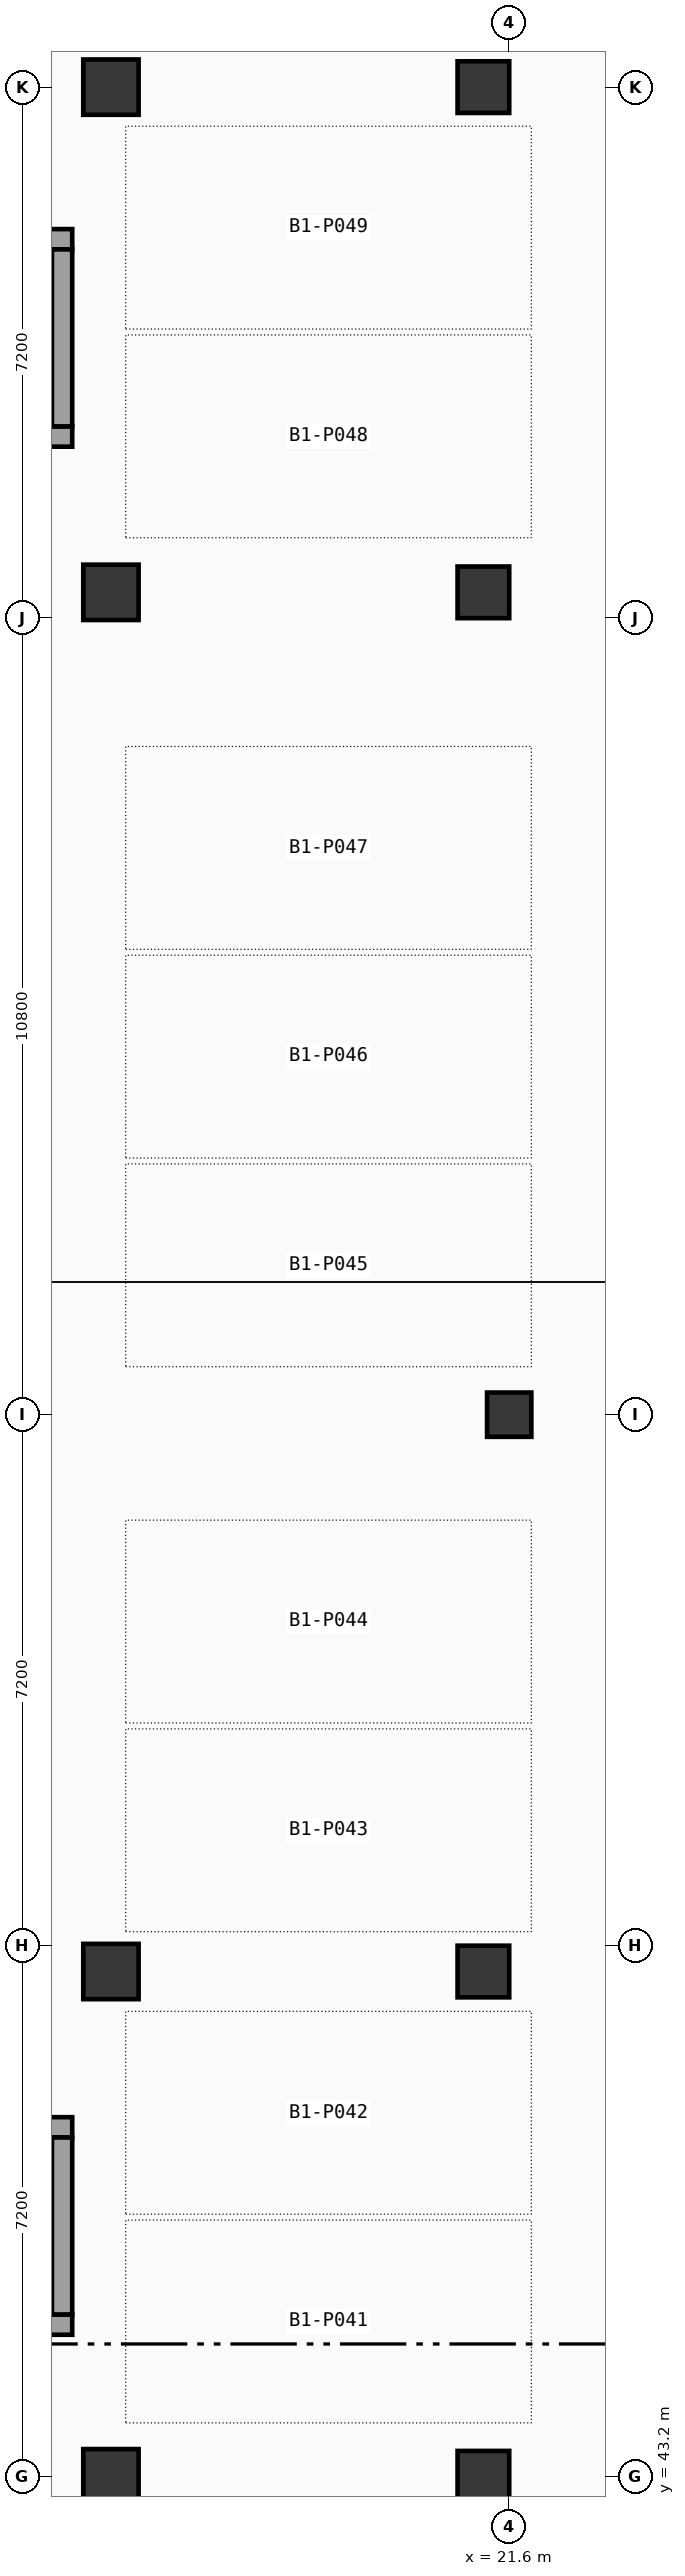
"""IFC4 building model, lengths in metres.
Left out: names, types, materials, properties, quantities, classifications, styles, units other than length and angle.
Written with IfcOpenShell. Run it as: python <this file> out.ifc"""

import sys

from ifc_helpers import new_model, si_unit, direction, frame, frame_2d, origin, origin_2d, place, context, subcontext, project, spatial, rectangle, extrude, element, save


model = new_model("IFC4")
c1 = context("Model", 3, precision=1e-05, world=origin(), true_north=direction((0.0, 1.0)))
c2 = subcontext(c1, "Body", "Model", "MODEL_VIEW")
j1 = project(units=[si_unit("LENGTHUNIT", "METRE"), si_unit("PLANEANGLEUNIT", "RADIAN")], contexts=[c1])
p1 = place(None, origin())
s1 = spatial("IfcSite", under=j1, at=p1, CompositionType="ELEMENT")
p2 = place(p1, origin())
s2 = spatial("IfcBuilding", under=s1, at=p2, CompositionType="ELEMENT")
p3 = place(p2, frame((0.0, 0.0, -4.2)))
s3 = spatial("IfcBuildingStorey", under=s2, at=p3, CompositionType="ELEMENT", Elevation=-4.2)
p4 = place(p3, frame((21.6, 57.6, 0.0), z_axis=(0.0, 0.0, 1.0), x_axis=(1.0, 0.0, 0.0)))
e1 = element("IfcColumn", 1, at=p4, inside=s3, PredefinedType="COLUMN", context=c2, shape_type="SweptSolid", body=[
    extrude(rectangle(XDim=0.6, YDim=0.6, at=origin_2d()), origin(), (0.0, 0.0, 1.0), 4.2),
])
for number, where, z_axis, x_axis in (
    (2, (16.2, 68.75, 0.0), (0.0, 0.0, 1.0), (1.0, 0.0, 0.0)),
    (3, (16.2, 75.6, 0.0), (0.0, 0.0, 1.0), (1.0, 0.0, 0.0)),
):
    element("IfcColumn", number, at=place(p3, frame(where, z_axis=z_axis, x_axis=x_axis)), inside=s3, PredefinedType="COLUMN", context=c2, shape_type="SweptSolid", body=[
        extrude(rectangle(XDim=0.75, YDim=0.75, at=origin_2d()), origin(), (0.0, 0.0, 1.0), 4.2),
    ])
for number, where, z_axis, x_axis in (
    (4, (21.25, 68.75, 0.0), (0.0, 0.0, 1.0), (1.0, 0.0, 0.0)),
    (5, (21.25, 75.6, 0.0), (0.0, 0.0, 1.0), (1.0, 0.0, 0.0)),
):
    element("IfcColumn", number, at=place(p3, frame(where, z_axis=z_axis, x_axis=x_axis)), inside=s3, PredefinedType="COLUMN", context=c2, shape_type="SweptSolid", body=[
        extrude(rectangle(XDim=0.7, YDim=0.7, at=origin_2d()), origin(), (0.0, 0.0, 1.0), 4.2),
    ])
for number, where, z_axis, x_axis in (
    (6, (16.2, 43.2, 0.0), (0.0, 0.0, 1.0), (1.0, 0.0, 0.0)),
    (7, (16.2, 50.05, 0.0), (0.0, 0.0, 1.0), (1.0, 0.0, 0.0)),
):
    element("IfcColumn", number, at=place(p3, frame(where, z_axis=z_axis, x_axis=x_axis)), inside=s3, PredefinedType="COLUMN", context=c2, shape_type="SweptSolid", body=[
        extrude(rectangle(XDim=0.75, YDim=0.75, at=origin_2d()), origin(), (0.0, 0.0, 1.0), 4.2),
    ])
for number, where, z_axis, x_axis in (
    (8, (21.25, 43.2, 0.0), (0.0, 0.0, 1.0), (1.0, 0.0, 0.0)),
    (9, (21.25, 50.05, 0.0), (0.0, 0.0, 1.0), (1.0, 0.0, 0.0)),
):
    element("IfcColumn", number, at=place(p3, frame(where, z_axis=z_axis, x_axis=x_axis)), inside=s3, PredefinedType="COLUMN", context=c2, shape_type="SweptSolid", body=[
        extrude(rectangle(XDim=0.7, YDim=0.7, at=origin_2d()), origin(), (0.0, 0.0, 1.0), 4.2),
    ])
for number, where, z_axis, x_axis in (
    (10, (13.525, 70.863, 0.0), (0.0, 0.0, 1.0), (1.0, 0.0, 0.0)),
    (11, (13.525, 73.538, 0.0), (0.0, 0.0, 1.0), (1.0, 0.0, 0.0)),
):
    element("IfcWall", number, at=place(p3, frame(where, z_axis=z_axis, x_axis=x_axis)), inside=s3, PredefinedType="SHEAR", context=c2, shape_type="SweptSolid", body=[
        extrude(rectangle(XDim=2.15, YDim=0.275, at=frame_2d((1.075, 0.0))), origin(), (0.0, 0.0, 1.0), 3.92),
    ])
p5 = place(p3, frame((15.538, 71.0, 0.0), z_axis=(0.0, 0.0, 1.0), x_axis=(0.0, 1.0, 0.0)))
e12 = element("IfcWall", 12, at=p5, inside=s3, PredefinedType="SHEAR", context=c2, shape_type="SweptSolid", body=[
    extrude(rectangle(XDim=2.4, YDim=0.275, at=frame_2d((1.2, 0.0))), origin(), (0.0, 0.0, 1.0), 3.92),
])
for number, where, z_axis, x_axis in (
    (13, (13.525, 45.262, 0.0), (0.0, 0.0, 1.0), (1.0, 0.0, 0.0)),
    (14, (13.525, 47.938, 0.0), (0.0, 0.0, 1.0), (1.0, 0.0, 0.0)),
):
    element("IfcWall", number, at=place(p3, frame(where, z_axis=z_axis, x_axis=x_axis)), inside=s3, PredefinedType="SHEAR", context=c2, shape_type="SweptSolid", body=[
        extrude(rectangle(XDim=2.15, YDim=0.275, at=frame_2d((1.075, 0.0))), origin(), (0.0, 0.0, 1.0), 3.92),
    ])
p6 = place(p3, frame((15.538, 45.4, 0.0), z_axis=(0.0, 0.0, 1.0), x_axis=(0.0, 1.0, 0.0)))
e15 = element("IfcWall", 15, at=p6, inside=s3, PredefinedType="SHEAR", context=c2, shape_type="SweptSolid", body=[
    extrude(rectangle(XDim=2.4, YDim=0.275, at=frame_2d((1.2, 0.0))), origin(), (0.0, 0.0, 1.0), 3.92),
])
save(model, sys.argv[1])
